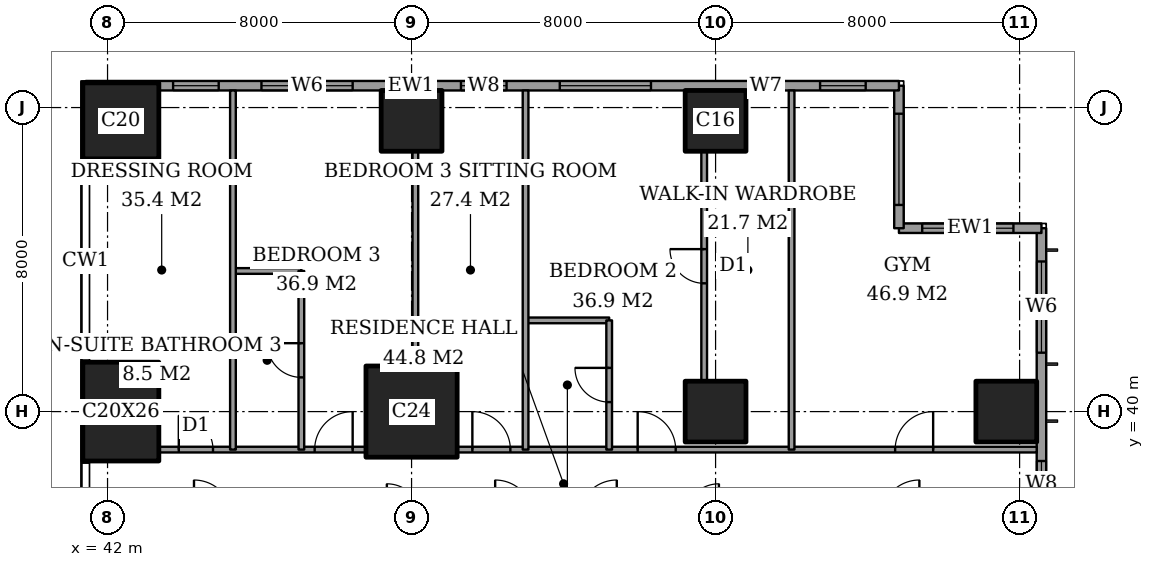
"""IFC4 building model, lengths in metres.
Left out: names, types, materials, properties, quantities, classifications, styles, units other than length and angle.
Written with IfcOpenShell. Run it as: python <this file> out.ifc"""

import sys

from ifc_helpers import new_model, si_unit, direction, frame, frame_2d, origin, origin_2d, place, context, subcontext, project, spatial, rectangle, extrude, element, fill, save


model = new_model("IFC4")
c1 = context("Model", 3, precision=1e-05, world=origin(), true_north=direction((0.0, 1.0)))
c2 = subcontext(c1, "Body", "Model", "MODEL_VIEW")
j1 = project(units=[si_unit("LENGTHUNIT", "METRE"), si_unit("PLANEANGLEUNIT", "RADIAN")], contexts=[c1])
p1 = place(None, origin())
s1 = spatial("IfcSite", under=j1, at=p1, CompositionType="ELEMENT")
p2 = place(p1, origin())
s2 = spatial("IfcBuilding", under=s1, at=p2, CompositionType="ELEMENT")
p3 = place(p2, frame((0.0, 0.0, 241.2)))
s3 = spatial("IfcBuildingStorey", under=s2, at=p3, CompositionType="ELEMENT", Elevation=241.2)
p4 = place(p3, frame((42.35, 40.0, 0.0), z_axis=(0.0, 0.0, 1.0), x_axis=(1.0, 0.0, 0.0)))
e1 = element("IfcColumn", 1, at=p4, inside=s3, PredefinedType="COLUMN", context=c2, shape_type="SweptSolid", body=[
    extrude(rectangle(XDim=2.0, YDim=2.6, at=origin_2d()), origin(), (0.0, 0.0, 1.0), 3.6),
])
p5 = place(p3, frame((42.35, 47.65, 0.0), z_axis=(0.0, 0.0, 1.0), x_axis=(1.0, 0.0, 0.0)))
e2 = element("IfcColumn", 2, at=p5, inside=s3, PredefinedType="COLUMN", context=c2, shape_type="SweptSolid", body=[
    extrude(rectangle(XDim=2.0, YDim=2.0, at=origin_2d()), origin(), (0.0, 0.0, 1.0), 3.6),
])
p6 = place(p3, frame((50.0, 40.0, 0.0), z_axis=(0.0, 0.0, 1.0), x_axis=(1.0, 0.0, 0.0)))
e3 = element("IfcColumn", 3, at=p6, inside=s3, PredefinedType="COLUMN", context=c2, shape_type="SweptSolid", body=[
    extrude(rectangle(XDim=2.4, YDim=2.4, at=origin_2d()), origin(), (0.0, 0.0, 1.0), 3.6),
])
for number, where, z_axis, x_axis in (
    (4, (50.0, 47.65, 0.0), (0.0, 0.0, 1.0), (1.0, 0.0, 0.0)),
    (5, (58.0, 40.0, 0.0), (0.0, 0.0, 1.0), (1.0, 0.0, 0.0)),
    (6, (58.0, 47.65, 0.0), (0.0, 0.0, 1.0), (1.0, 0.0, 0.0)),
    (7, (65.65, 40.0, 0.0), (0.0, 0.0, 1.0), (1.0, 0.0, 0.0)),
):
    element("IfcColumn", number, at=place(p3, frame(where, z_axis=z_axis, x_axis=x_axis)), inside=s3, PredefinedType="COLUMN", context=c2, shape_type="SweptSolid", body=[
        extrude(rectangle(XDim=1.6, YDim=1.6, at=origin_2d()), origin(), (0.0, 0.0, 1.0), 3.6),
    ])
p7 = place(p3, frame((66.575, 3.175, 0.0), z_axis=(0.0, 0.0, 1.0), x_axis=(0.0, 1.0, 0.0)))
e8 = element("IfcWall", 8, at=p7, inside=s3, PredefinedType="SOLIDWALL", context=c2, shape_type="SweptSolid", body=[
    extrude(rectangle(XDim=41.65, YDim=0.25, at=frame_2d((20.825, 0.0))), origin(), (0.0, 0.0, 1.0), 3.6),
])
p8 = place(p7, frame((0.875, 0.0, 0.6)))
e9 = element("IfcOpeningElement", 9, at=p8, cuts=e8, PredefinedType="OPENING", context=c2, shape_type="SweptSolid", body=[
    extrude(rectangle(XDim=2.4, YDim=2.0, at=frame_2d((1.2, 1.0))), frame((0.0, 0.135, 0.0), z_axis=(0.0, -1.0, 0.0), x_axis=(1.0, 0.0, 0.0)), (0.0, 0.0, 1.0), 0.27),
])
p9 = place(p7, frame((6.0, 0.0, 0.6)))
e10 = element("IfcOpeningElement", 10, at=p9, cuts=e8, PredefinedType="OPENING", context=c2, shape_type="SweptSolid", body=[
    extrude(rectangle(XDim=1.2, YDim=2.0, at=frame_2d((0.6, 1.0))), frame((0.0, 0.135, 0.0), z_axis=(0.0, -1.0, 0.0), x_axis=(1.0, 0.0, 0.0)), (0.0, 0.0, 1.0), 0.27),
])
p10 = place(p7, frame((8.525, 0.0, 0.6)))
e11 = element("IfcOpeningElement", 11, at=p10, cuts=e8, PredefinedType="OPENING", context=c2, shape_type="SweptSolid", body=[
    extrude(rectangle(XDim=2.4, YDim=2.0, at=frame_2d((1.2, 1.0))), frame((0.0, 0.135, 0.0), z_axis=(0.0, -1.0, 0.0), x_axis=(1.0, 0.0, 0.0)), (0.0, 0.0, 1.0), 0.27),
])
p11 = place(p7, frame((15.725, 0.0, 0.6)))
e12 = element("IfcOpeningElement", 12, at=p11, cuts=e8, PredefinedType="OPENING", context=c2, shape_type="SweptSolid", body=[
    extrude(rectangle(XDim=2.4, YDim=2.0, at=frame_2d((1.2, 1.0))), frame((0.0, 0.135, 0.0), z_axis=(0.0, -1.0, 0.0), x_axis=(1.0, 0.0, 0.0)), (0.0, 0.0, 1.0), 0.27),
])
p12 = place(p7, frame((23.525, 0.0, 0.6)))
e13 = element("IfcOpeningElement", 13, at=p12, cuts=e8, PredefinedType="OPENING", context=c2, shape_type="SweptSolid", body=[
    extrude(rectangle(XDim=2.4, YDim=2.0, at=frame_2d((1.2, 1.0))), frame((0.0, 0.135, 0.0), z_axis=(0.0, -1.0, 0.0), x_axis=(1.0, 0.0, 0.0)), (0.0, 0.0, 1.0), 0.27),
])
p13 = place(p7, frame((30.625, 0.0, 0.6)))
e14 = element("IfcOpeningElement", 14, at=p13, cuts=e8, PredefinedType="OPENING", context=c2, shape_type="SweptSolid", body=[
    extrude(rectangle(XDim=2.4, YDim=2.0, at=frame_2d((1.2, 1.0))), frame((0.0, 0.135, 0.0), z_axis=(0.0, -1.0, 0.0), x_axis=(1.0, 0.0, 0.0)), (0.0, 0.0, 1.0), 0.27),
])
p14 = place(p7, frame((34.325, 0.0, 0.6)))
e15 = element("IfcOpeningElement", 15, at=p14, cuts=e8, PredefinedType="OPENING", context=c2, shape_type="SweptSolid", body=[
    extrude(rectangle(XDim=1.2, YDim=2.0, at=frame_2d((0.6, 1.0))), frame((0.0, 0.135, 0.0), z_axis=(0.0, -1.0, 0.0), x_axis=(1.0, 0.0, 0.0)), (0.0, 0.0, 1.0), 0.27),
])
p15 = place(p7, frame((38.375, 0.0, 0.6)))
e16 = element("IfcOpeningElement", 16, at=p15, cuts=e8, PredefinedType="OPENING", context=c2, shape_type="SweptSolid", body=[
    extrude(rectangle(XDim=2.4, YDim=2.0, at=frame_2d((1.2, 1.0))), frame((0.0, 0.135, 0.0), z_axis=(0.0, -1.0, 0.0), x_axis=(1.0, 0.0, 0.0)), (0.0, 0.0, 1.0), 0.27),
])
p16 = place(p3, frame((66.575, 44.825, 0.0), z_axis=(0.0, 0.0, 1.0), x_axis=(-1.0, 0.0, 0.0)))
e17 = element("IfcWall", 17, at=p16, inside=s3, PredefinedType="SOLIDWALL", context=c2, shape_type="SweptSolid", body=[
    extrude(rectangle(XDim=3.75, YDim=0.25, at=frame_2d((1.875, 0.0))), origin(), (0.0, 0.0, 1.0), 3.6),
])
p17 = place(p16, frame((0.738, 0.0, 0.6)))
e18 = element("IfcOpeningElement", 18, at=p17, cuts=e17, PredefinedType="OPENING", context=c2, shape_type="SweptSolid", body=[
    extrude(rectangle(XDim=2.4, YDim=2.0, at=frame_2d((1.2, 1.0))), frame((0.0, 0.135, 0.0), z_axis=(0.0, -1.0, 0.0), x_axis=(1.0, 0.0, 0.0)), (0.0, 0.0, 1.0), 0.27),
])
p18 = place(p3, frame((62.825, 44.825, 0.0), z_axis=(0.0, 0.0, 1.0), x_axis=(0.0, 1.0, 0.0)))
e19 = element("IfcWall", 19, at=p18, inside=s3, PredefinedType="SOLIDWALL", context=c2, shape_type="SweptSolid", body=[
    extrude(rectangle(XDim=3.75, YDim=0.25, at=frame_2d((1.875, 0.0))), origin(), (0.0, 0.0, 1.0), 3.6),
])
p19 = place(p18, frame((0.613, 0.0, 0.6)))
e20 = element("IfcOpeningElement", 20, at=p19, cuts=e19, PredefinedType="OPENING", context=c2, shape_type="SweptSolid", body=[
    extrude(rectangle(XDim=2.4, YDim=2.0, at=frame_2d((1.2, 1.0))), frame((0.0, 0.135, 0.0), z_axis=(0.0, -1.0, 0.0), x_axis=(1.0, 0.0, 0.0)), (0.0, 0.0, 1.0), 0.27),
])
p20 = place(p3, frame((62.825, 48.575, 0.0), z_axis=(0.0, 0.0, 1.0), x_axis=(-1.0, 0.0, 0.0)))
e21 = element("IfcWall", 21, at=p20, inside=s3, PredefinedType="SOLIDWALL", context=c2, shape_type="SweptSolid", body=[
    extrude(rectangle(XDim=21.4, YDim=0.25, at=frame_2d((10.7, 0.0))), origin(), (0.0, 0.0, 1.0), 3.6),
])
p21 = place(p20, frame((0.875, 0.0, 0.6)))
e22 = element("IfcOpeningElement", 22, at=p21, cuts=e21, PredefinedType="OPENING", context=c2, shape_type="SweptSolid", body=[
    extrude(rectangle(XDim=1.2, YDim=2.0, at=frame_2d((0.6, 1.0))), frame((0.0, 0.135, 0.0), z_axis=(0.0, -1.0, 0.0), x_axis=(1.0, 0.0, 0.0)), (0.0, 0.0, 1.0), 0.27),
])
p22 = place(p20, frame((3.2, 0.0, 0.6)))
e23 = element("IfcOpeningElement", 23, at=p22, cuts=e21, PredefinedType="OPENING", context=c2, shape_type="SweptSolid", body=[
    extrude(rectangle(XDim=0.6, YDim=2.0, at=frame_2d((0.3, 1.0))), frame((0.0, 0.135, 0.0), z_axis=(0.0, -1.0, 0.0), x_axis=(1.0, 0.0, 0.0)), (0.0, 0.0, 1.0), 0.27),
])
p23 = place(p20, frame((6.525, 0.0, 0.6)))
e24 = element("IfcOpeningElement", 24, at=p23, cuts=e21, PredefinedType="OPENING", context=c2, shape_type="SweptSolid", body=[
    extrude(rectangle(XDim=2.4, YDim=2.0, at=frame_2d((1.2, 1.0))), frame((0.0, 0.135, 0.0), z_axis=(0.0, -1.0, 0.0), x_axis=(1.0, 0.0, 0.0)), (0.0, 0.0, 1.0), 0.27),
])
p24 = place(p20, frame((10.325, 0.0, 0.6)))
e25 = element("IfcOpeningElement", 25, at=p24, cuts=e21, PredefinedType="OPENING", context=c2, shape_type="SweptSolid", body=[
    extrude(rectangle(XDim=1.2, YDim=2.0, at=frame_2d((0.6, 1.0))), frame((0.0, 0.135, 0.0), z_axis=(0.0, -1.0, 0.0), x_axis=(1.0, 0.0, 0.0)), (0.0, 0.0, 1.0), 0.27),
])
p25 = place(p20, frame((14.375, 0.0, 0.6)))
e26 = element("IfcOpeningElement", 26, at=p25, cuts=e21, PredefinedType="OPENING", context=c2, shape_type="SweptSolid", body=[
    extrude(rectangle(XDim=2.4, YDim=2.0, at=frame_2d((1.2, 1.0))), frame((0.0, 0.135, 0.0), z_axis=(0.0, -1.0, 0.0), x_axis=(1.0, 0.0, 0.0)), (0.0, 0.0, 1.0), 0.27),
])
p26 = place(p20, frame((17.9, 0.0, 0.6)))
e27 = element("IfcOpeningElement", 27, at=p26, cuts=e21, PredefinedType="OPENING", context=c2, shape_type="SweptSolid", body=[
    extrude(rectangle(XDim=1.2, YDim=2.0, at=frame_2d((0.6, 1.0))), frame((0.0, 0.135, 0.0), z_axis=(0.0, -1.0, 0.0), x_axis=(1.0, 0.0, 0.0)), (0.0, 0.0, 1.0), 0.27),
])
p27 = place(p3, frame((43.35, 39.0, 0.0), z_axis=(0.0, 0.0, 1.0), x_axis=(1.0, 0.0, 0.0)))
e28 = element("IfcWall", 28, at=p27, inside=s3, PredefinedType="PARTITIONING", context=c2, shape_type="SweptSolid", body=[
    extrude(rectangle(XDim=5.45, YDim=0.15, at=frame_2d((2.725, 0.0))), origin(), (0.0, 0.0, 1.0), 3.35),
])
p28 = place(p27, frame((4.1, 0.0, 0.0)))
e29 = element("IfcOpeningElement", 29, at=p28, cuts=e28, PredefinedType="OPENING", context=c2, shape_type="SweptSolid", body=[
    extrude(rectangle(XDim=1.0, YDim=2.1, at=frame_2d((0.5, 1.05))), frame((0.0, 0.085, 0.0), z_axis=(0.0, -1.0, 0.0), x_axis=(1.0, 0.0, 0.0)), (0.0, 0.0, 1.0), 0.17),
])
p29 = place(p27, frame((0.525, 0.0, 0.0)))
e30 = element("IfcOpeningElement", 30, at=p29, cuts=e28, PredefinedType="OPENING", context=c2, shape_type="SweptSolid", body=[
    extrude(rectangle(XDim=0.9, YDim=2.1, at=frame_2d((0.45, 1.05))), frame((0.0, 0.085, 0.0), z_axis=(0.0, -1.0, 0.0), x_axis=(1.0, 0.0, 0.0)), (0.0, 0.0, 1.0), 0.17),
])
p30 = place(p3, frame((51.2, 39.0, 0.0), z_axis=(0.0, 0.0, 1.0), x_axis=(1.0, 0.0, 0.0)))
e31 = element("IfcWall", 31, at=p30, inside=s3, PredefinedType="PARTITIONING", context=c2, shape_type="SweptSolid", body=[
    extrude(rectangle(XDim=15.25, YDim=0.15, at=frame_2d((7.625, 0.0))), origin(), (0.0, 0.0, 1.0), 3.35),
])
p31 = place(p30, frame((11.525, 0.0, 0.0)))
e32 = element("IfcOpeningElement", 32, at=p31, cuts=e31, PredefinedType="OPENING", context=c2, shape_type="SweptSolid", body=[
    extrude(rectangle(XDim=1.0, YDim=2.1, at=frame_2d((0.5, 1.05))), frame((0.0, 0.085, 0.0), z_axis=(0.0, -1.0, 0.0), x_axis=(1.0, 0.0, 0.0)), (0.0, 0.0, 1.0), 0.17),
])
p32 = place(p30, frame((4.75, 0.0, 0.0)))
e33 = element("IfcOpeningElement", 33, at=p32, cuts=e31, PredefinedType="OPENING", context=c2, shape_type="SweptSolid", body=[
    extrude(rectangle(XDim=1.0, YDim=2.1, at=frame_2d((0.5, 1.05))), frame((0.0, 0.085, 0.0), z_axis=(0.0, -1.0, 0.0), x_axis=(1.0, 0.0, 0.0)), (0.0, 0.0, 1.0), 0.17),
])
p33 = place(p30, frame((0.4, 0.0, 0.0)))
e34 = element("IfcOpeningElement", 34, at=p33, cuts=e31, PredefinedType="OPENING", context=c2, shape_type="SweptSolid", body=[
    extrude(rectangle(XDim=1.0, YDim=2.1, at=frame_2d((0.5, 1.05))), frame((0.0, 0.085, 0.0), z_axis=(0.0, -1.0, 0.0), x_axis=(1.0, 0.0, 0.0)), (0.0, 0.0, 1.0), 0.17),
])
p34 = place(p3, frame((53.0, 42.4, 0.0), z_axis=(0.0, 0.0, 1.0), x_axis=(1.0, 0.0, 0.0)))
e35 = element("IfcWall", 35, at=p34, inside=s3, PredefinedType="PARTITIONING", context=c2, shape_type="SweptSolid", body=[
    extrude(rectangle(XDim=2.2, YDim=0.15, at=frame_2d((1.1, 0.0))), origin(), (0.0, 0.0, 1.0), 3.35),
])
p35 = place(p3, frame((45.3, 43.7, 0.0), z_axis=(0.0, 0.0, 1.0), x_axis=(1.0, 0.0, 0.0)))
e36 = element("IfcWall", 36, at=p35, inside=s3, PredefinedType="PARTITIONING", context=c2, shape_type="SweptSolid", body=[
    extrude(rectangle(XDim=1.8, YDim=0.15, at=frame_2d((0.9, 0.0))), origin(), (0.0, 0.0, 1.0), 3.35),
])
p36 = place(p3, frame((45.3, 39.0, 0.0), z_axis=(0.0, 0.0, 1.0), x_axis=(0.0, 1.0, 0.0)))
e37 = element("IfcWall", 37, at=p36, inside=s3, PredefinedType="PARTITIONING", context=c2, shape_type="SweptSolid", body=[
    extrude(rectangle(XDim=9.45, YDim=0.15, at=frame_2d((4.725, 0.0))), origin(), (0.0, 0.0, 1.0), 3.35),
])
p37 = place(p3, frame((47.1, 39.0, 0.0), z_axis=(0.0, 0.0, 1.0), x_axis=(0.0, 1.0, 0.0)))
e38 = element("IfcWall", 38, at=p37, inside=s3, PredefinedType="PARTITIONING", context=c2, shape_type="SweptSolid", body=[
    extrude(rectangle(XDim=4.7, YDim=0.15, at=frame_2d((2.35, 0.0))), origin(), (0.0, 0.0, 1.0), 3.35),
])
p38 = place(p37, frame((1.9, 0.0, 0.0)))
e39 = element("IfcOpeningElement", 39, at=p38, cuts=e38, PredefinedType="OPENING", context=c2, shape_type="SweptSolid", body=[
    extrude(rectangle(XDim=0.9, YDim=2.1, at=frame_2d((0.45, 1.05))), frame((0.0, 0.085, 0.0), z_axis=(0.0, -1.0, 0.0), x_axis=(1.0, 0.0, 0.0)), (0.0, 0.0, 1.0), 0.17),
])
p39 = place(p3, frame((50.1, 41.2, 0.0), z_axis=(0.0, 0.0, 1.0), x_axis=(0.0, 1.0, 0.0)))
e40 = element("IfcWall", 40, at=p39, inside=s3, PredefinedType="PARTITIONING", context=c2, shape_type="SweptSolid", body=[
    extrude(rectangle(XDim=5.65, YDim=0.15, at=frame_2d((2.825, 0.0))), origin(), (0.0, 0.0, 1.0), 3.35),
])
p40 = place(p3, frame((53.0, 39.0, 0.0), z_axis=(0.0, 0.0, 1.0), x_axis=(0.0, 1.0, 0.0)))
e41 = element("IfcWall", 41, at=p40, inside=s3, PredefinedType="PARTITIONING", context=c2, shape_type="SweptSolid", body=[
    extrude(rectangle(XDim=9.45, YDim=0.15, at=frame_2d((4.725, 0.0))), origin(), (0.0, 0.0, 1.0), 3.35),
])
p41 = place(p3, frame((55.2, 39.0, 0.0), z_axis=(0.0, 0.0, 1.0), x_axis=(0.0, 1.0, 0.0)))
e42 = element("IfcWall", 42, at=p41, inside=s3, PredefinedType="PARTITIONING", context=c2, shape_type="SweptSolid", body=[
    extrude(rectangle(XDim=3.4, YDim=0.15, at=frame_2d((1.7, 0.0))), origin(), (0.0, 0.0, 1.0), 3.35),
])
p42 = place(p41, frame((1.25, 0.0, 0.0)))
e43 = element("IfcOpeningElement", 43, at=p42, cuts=e42, PredefinedType="OPENING", context=c2, shape_type="SweptSolid", body=[
    extrude(rectangle(XDim=0.9, YDim=2.1, at=frame_2d((0.45, 1.05))), frame((0.0, 0.085, 0.0), z_axis=(0.0, -1.0, 0.0), x_axis=(1.0, 0.0, 0.0)), (0.0, 0.0, 1.0), 0.17),
])
p43 = place(p3, frame((57.7, 40.8, 0.0), z_axis=(0.0, 0.0, 1.0), x_axis=(0.0, 1.0, 0.0)))
e44 = element("IfcWall", 44, at=p43, inside=s3, PredefinedType="PARTITIONING", context=c2, shape_type="SweptSolid", body=[
    extrude(rectangle(XDim=6.05, YDim=0.15, at=frame_2d((3.025, 0.0))), origin(), (0.0, 0.0, 1.0), 3.35),
])
p44 = place(p43, frame((2.575, 0.0, 0.0)))
e45 = element("IfcOpeningElement", 45, at=p44, cuts=e44, PredefinedType="OPENING", context=c2, shape_type="SweptSolid", body=[
    extrude(rectangle(XDim=0.9, YDim=2.1, at=frame_2d((0.45, 1.05))), frame((0.0, 0.085, 0.0), z_axis=(0.0, -1.0, 0.0), x_axis=(1.0, 0.0, 0.0)), (0.0, 0.0, 1.0), 0.17),
])
p45 = place(p3, frame((60.0, 39.0, 0.0), z_axis=(0.0, 0.0, 1.0), x_axis=(0.0, 1.0, 0.0)))
e46 = element("IfcWall", 46, at=p45, inside=s3, PredefinedType="PARTITIONING", context=c2, shape_type="SweptSolid", body=[
    extrude(rectangle(XDim=9.45, YDim=0.15, at=frame_2d((4.725, 0.0))), origin(), (0.0, 0.0, 1.0), 3.35),
])
p46 = place(p14, origin())
e47 = element("IfcWindow", 47, at=p46, inside=s3, PartitioningType="SINGLE_PANEL", PredefinedType="WINDOW", context=c2, shape_type="SweptSolid", body=[
    extrude(rectangle(XDim=1.2, YDim=2.0, at=frame_2d((0.6, 1.0))), frame((0.0, 0.03, 0.0), z_axis=(0.0, -1.0, 0.0), x_axis=(1.0, 0.0, 0.0)), (0.0, 0.0, 1.0), 0.06),
])
fill(e15, e47)
p47 = place(p15, origin())
e48 = element("IfcWindow", 48, at=p47, inside=s3, PartitioningType="SINGLE_PANEL", PredefinedType="WINDOW", context=c2, shape_type="SweptSolid", body=[
    extrude(rectangle(XDim=2.4, YDim=2.0, at=frame_2d((1.2, 1.0))), frame((0.0, 0.03, 0.0), z_axis=(0.0, -1.0, 0.0), x_axis=(1.0, 0.0, 0.0)), (0.0, 0.0, 1.0), 0.06),
])
fill(e16, e48)
p48 = place(p17, origin())
e49 = element("IfcWindow", 49, at=p48, inside=s3, PartitioningType="SINGLE_PANEL", PredefinedType="WINDOW", context=c2, shape_type="SweptSolid", body=[
    extrude(rectangle(XDim=2.4, YDim=2.0, at=frame_2d((1.2, 1.0))), frame((0.0, 0.03, 0.0), z_axis=(0.0, -1.0, 0.0), x_axis=(1.0, 0.0, 0.0)), (0.0, 0.0, 1.0), 0.06),
])
fill(e18, e49)
p49 = place(p19, origin())
e50 = element("IfcWindow", 50, at=p49, inside=s3, PartitioningType="SINGLE_PANEL", PredefinedType="WINDOW", context=c2, shape_type="SweptSolid", body=[
    extrude(rectangle(XDim=2.4, YDim=2.0, at=frame_2d((1.2, 1.0))), frame((0.0, 0.03, 0.0), z_axis=(0.0, -1.0, 0.0), x_axis=(1.0, 0.0, 0.0)), (0.0, 0.0, 1.0), 0.06),
])
fill(e20, e50)
p50 = place(p21, origin())
e51 = element("IfcWindow", 51, at=p50, inside=s3, PartitioningType="SINGLE_PANEL", PredefinedType="WINDOW", context=c2, shape_type="SweptSolid", body=[
    extrude(rectangle(XDim=1.2, YDim=2.0, at=frame_2d((0.6, 1.0))), frame((0.0, 0.03, 0.0), z_axis=(0.0, -1.0, 0.0), x_axis=(1.0, 0.0, 0.0)), (0.0, 0.0, 1.0), 0.06),
])
fill(e22, e51)
p51 = place(p22, origin())
e52 = element("IfcWindow", 52, at=p51, inside=s3, PartitioningType="SINGLE_PANEL", PredefinedType="WINDOW", context=c2, shape_type="SweptSolid", body=[
    extrude(rectangle(XDim=0.6, YDim=2.0, at=frame_2d((0.3, 1.0))), frame((0.0, 0.03, 0.0), z_axis=(0.0, -1.0, 0.0), x_axis=(1.0, 0.0, 0.0)), (0.0, 0.0, 1.0), 0.06),
])
fill(e23, e52)
p52 = place(p23, origin())
e53 = element("IfcWindow", 53, at=p52, inside=s3, PartitioningType="SINGLE_PANEL", PredefinedType="WINDOW", context=c2, shape_type="SweptSolid", body=[
    extrude(rectangle(XDim=2.4, YDim=2.0, at=frame_2d((1.2, 1.0))), frame((0.0, 0.03, 0.0), z_axis=(0.0, -1.0, 0.0), x_axis=(1.0, 0.0, 0.0)), (0.0, 0.0, 1.0), 0.06),
])
fill(e24, e53)
p53 = place(p24, origin())
e54 = element("IfcWindow", 54, at=p53, inside=s3, PartitioningType="SINGLE_PANEL", PredefinedType="WINDOW", context=c2, shape_type="SweptSolid", body=[
    extrude(rectangle(XDim=1.2, YDim=2.0, at=frame_2d((0.6, 1.0))), frame((0.0, 0.03, 0.0), z_axis=(0.0, -1.0, 0.0), x_axis=(1.0, 0.0, 0.0)), (0.0, 0.0, 1.0), 0.06),
])
fill(e25, e54)
p54 = place(p25, origin())
e55 = element("IfcWindow", 55, at=p54, inside=s3, PartitioningType="SINGLE_PANEL", PredefinedType="WINDOW", context=c2, shape_type="SweptSolid", body=[
    extrude(rectangle(XDim=2.4, YDim=2.0, at=frame_2d((1.2, 1.0))), frame((0.0, 0.03, 0.0), z_axis=(0.0, -1.0, 0.0), x_axis=(1.0, 0.0, 0.0)), (0.0, 0.0, 1.0), 0.06),
])
fill(e26, e55)
p55 = place(p26, origin())
e56 = element("IfcWindow", 56, at=p55, inside=s3, PartitioningType="SINGLE_PANEL", PredefinedType="WINDOW", context=c2, shape_type="SweptSolid", body=[
    extrude(rectangle(XDim=1.2, YDim=2.0, at=frame_2d((0.6, 1.0))), frame((0.0, 0.03, 0.0), z_axis=(0.0, -1.0, 0.0), x_axis=(1.0, 0.0, 0.0)), (0.0, 0.0, 1.0), 0.06),
])
fill(e27, e56)
p56 = place(p31, origin())
e57 = element("IfcDoor", 57, at=p56, inside=s3, OperationType="SINGLE_SWING_LEFT", PredefinedType="DOOR", context=c2, shape_type="SweptSolid", body=[
    extrude(rectangle(XDim=1.0, YDim=2.1, at=frame_2d((0.5, 1.05))), frame((0.0, 0.025, 0.0), z_axis=(0.0, -1.0, 0.0), x_axis=(1.0, 0.0, 0.0)), (0.0, 0.0, 1.0), 0.05),
])
fill(e32, e57)
p57 = place(p44, origin())
e58 = element("IfcDoor", 58, at=p57, inside=s3, OperationType="SINGLE_SWING_LEFT", PredefinedType="DOOR", context=c2, shape_type="SweptSolid", body=[
    extrude(rectangle(XDim=0.9, YDim=2.1, at=frame_2d((0.45, 1.05))), frame((0.0, 0.025, 0.0), z_axis=(0.0, -1.0, 0.0), x_axis=(1.0, 0.0, 0.0)), (0.0, 0.0, 1.0), 0.05),
])
fill(e45, e58)
p58 = place(p42, origin())
e59 = element("IfcDoor", 59, at=p58, inside=s3, OperationType="SINGLE_SWING_LEFT", PredefinedType="DOOR", context=c2, shape_type="SweptSolid", body=[
    extrude(rectangle(XDim=0.9, YDim=2.1, at=frame_2d((0.45, 1.05))), frame((0.0, 0.025, 0.0), z_axis=(0.0, -1.0, 0.0), x_axis=(1.0, 0.0, 0.0)), (0.0, 0.0, 1.0), 0.05),
])
fill(e43, e59)
p59 = place(p32, origin())
e60 = element("IfcDoor", 60, at=p59, inside=s3, OperationType="SINGLE_SWING_RIGHT", PredefinedType="DOOR", context=c2, shape_type="SweptSolid", body=[
    extrude(rectangle(XDim=1.0, YDim=2.1, at=frame_2d((0.5, 1.05))), frame((0.0, 0.025, 0.0), z_axis=(0.0, -1.0, 0.0), x_axis=(1.0, 0.0, 0.0)), (0.0, 0.0, 1.0), 0.05),
])
fill(e33, e60)
p60 = place(p33, origin())
e61 = element("IfcDoor", 61, at=p60, inside=s3, OperationType="SINGLE_SWING_RIGHT", PredefinedType="DOOR", context=c2, shape_type="SweptSolid", body=[
    extrude(rectangle(XDim=1.0, YDim=2.1, at=frame_2d((0.5, 1.05))), frame((0.0, 0.025, 0.0), z_axis=(0.0, -1.0, 0.0), x_axis=(1.0, 0.0, 0.0)), (0.0, 0.0, 1.0), 0.05),
])
fill(e34, e61)
p61 = place(p38, origin())
e62 = element("IfcDoor", 62, at=p61, inside=s3, OperationType="SINGLE_SWING_LEFT", PredefinedType="DOOR", context=c2, shape_type="SweptSolid", body=[
    extrude(rectangle(XDim=0.9, YDim=2.1, at=frame_2d((0.45, 1.05))), frame((0.0, 0.025, 0.0), z_axis=(0.0, -1.0, 0.0), x_axis=(1.0, 0.0, 0.0)), (0.0, 0.0, 1.0), 0.05),
])
fill(e39, e62)
p62 = place(p28, origin())
e63 = element("IfcDoor", 63, at=p62, inside=s3, OperationType="SINGLE_SWING_LEFT", PredefinedType="DOOR", context=c2, shape_type="SweptSolid", body=[
    extrude(rectangle(XDim=1.0, YDim=2.1, at=frame_2d((0.5, 1.05))), frame((0.0, 0.025, 0.0), z_axis=(0.0, -1.0, 0.0), x_axis=(1.0, 0.0, 0.0)), (0.0, 0.0, 1.0), 0.05),
])
fill(e29, e63)
p63 = place(p29, origin())
e64 = element("IfcDoor", 64, at=p63, inside=s3, OperationType="SINGLE_SWING_RIGHT", PredefinedType="DOOR", context=c2, shape_type="SweptSolid", body=[
    extrude(rectangle(XDim=0.9, YDim=2.1, at=frame_2d((0.45, 1.05))), frame((0.0, 0.025, 0.0), z_axis=(0.0, -1.0, 0.0), x_axis=(1.0, 0.0, 0.0)), (0.0, 0.0, 1.0), 0.05),
])
fill(e30, e64)
save(model, sys.argv[1])
